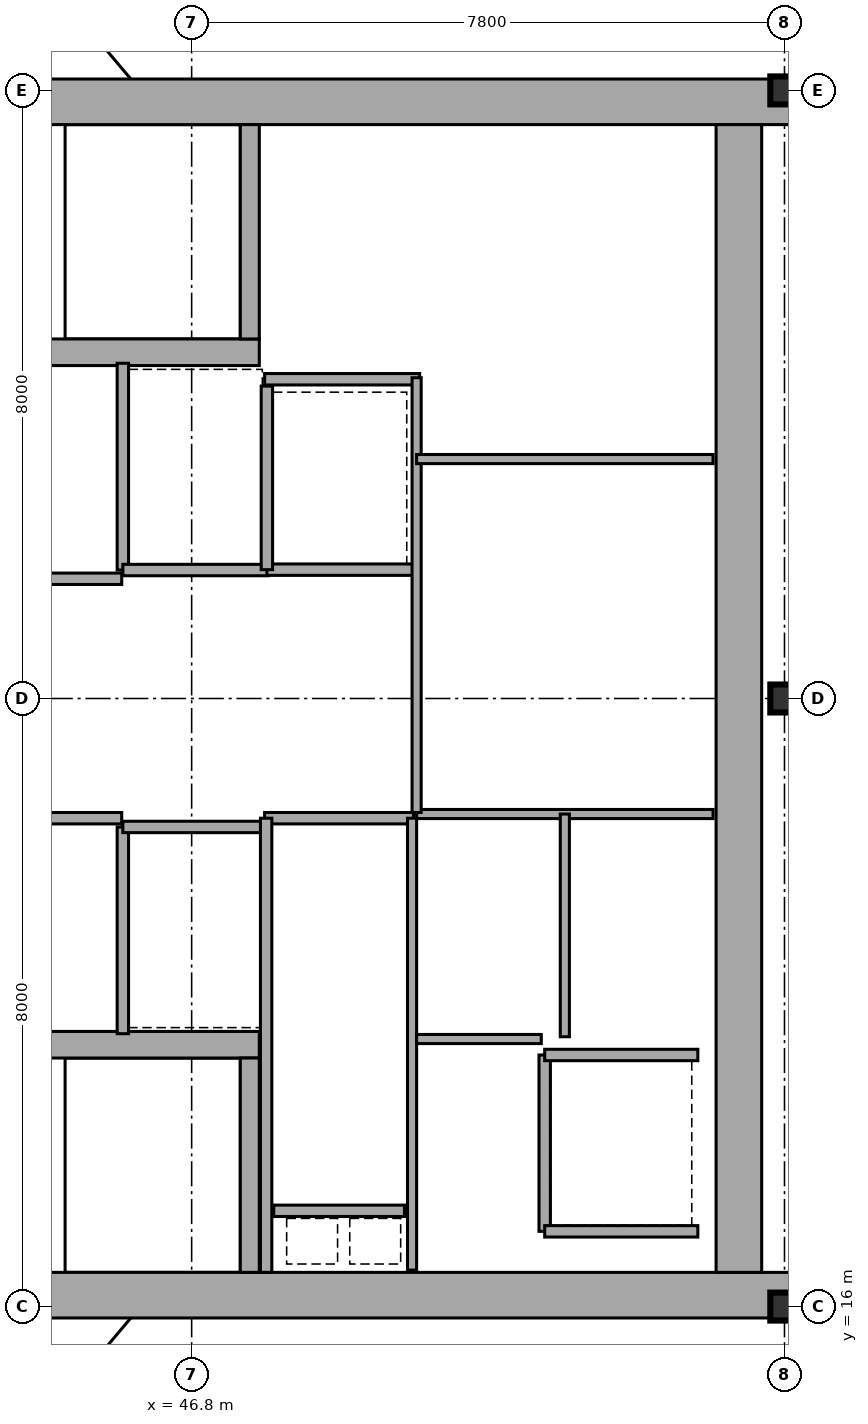
"""IFC4 building model, lengths in metres.
Left out: names, types, materials, properties, quantities, classifications, styles, units other than length and angle.
Written with IfcOpenShell. Run it as: python <this file> out.ifc"""

import sys

from ifc_helpers import new_model, si_unit, direction, frame, frame_2d, origin, origin_2d, place, context, subcontext, project, spatial, rectangle, i_section, extrude, element, fill, save


model = new_model("IFC4")
c1 = context("Model", 3, precision=1e-05, world=origin(), true_north=direction((0.0, 1.0)))
c2 = subcontext(c1, "Body", "Model", "MODEL_VIEW")
j1 = project(units=[si_unit("LENGTHUNIT", "METRE"), si_unit("PLANEANGLEUNIT", "RADIAN")], contexts=[c1])
p1 = place(None, origin())
s1 = spatial("IfcSite", under=j1, at=p1, CompositionType="ELEMENT")
p2 = place(p1, origin())
s2 = spatial("IfcBuilding", under=s1, at=p2, CompositionType="ELEMENT")
p3 = place(p2, frame((0.0, 0.0, 262.05)))
s3 = spatial("IfcBuildingStorey", under=s2, at=p3, CompositionType="ELEMENT", Elevation=262.05)
for number, where, z_axis, x_axis in (
    (1, (38.8, 31.85, 0.0), (0.0, 0.0, 1.0), (1.0, 0.0, 0.0)),
    (2, (38.8, 16.15, 0.0), (0.0, 0.0, 1.0), (1.0, 0.0, 0.0)),
):
    element("IfcWall", number, at=place(p3, frame(where, z_axis=z_axis, x_axis=x_axis)), inside=s3, PredefinedType="SHEAR", context=c2, shape_type="SweptSolid", body=[
        extrude(rectangle(XDim=16.0, YDim=0.6, at=frame_2d((8.0, 0.0))), origin(), (0.0, 0.0, 1.0), 4.56),
    ])
p4 = place(p3, frame((54.0, 16.45, 0.0), z_axis=(0.0, 0.0, 1.0), x_axis=(0.0, 1.0, 0.0)))
e3 = element("IfcWall", 3, at=p4, inside=s3, PredefinedType="SHEAR", context=c2, shape_type="SweptSolid", body=[
    extrude(rectangle(XDim=15.1, YDim=0.6, at=frame_2d((7.55, 0.0))), origin(), (0.0, 0.0, 1.0), 4.56),
])
p5 = place(p3, frame((39.98, 28.555, 0.0), z_axis=(0.0, 0.0, 1.0), x_axis=(1.0, 0.0, 0.0)))
e4 = element("IfcWall", 4, at=p5, inside=s3, PredefinedType="SHEAR", context=c2, shape_type="SweptSolid", body=[
    extrude(rectangle(XDim=7.71, YDim=0.35, at=frame_2d((3.855, 0.0))), origin(), (0.0, 0.0, 1.0), 4.56),
])
p6 = place(p5, frame((0.25, 0.0, 0.0)))
e5 = element("IfcOpeningElement", 5, at=p6, cuts=e4, PredefinedType="OPENING", context=c2, shape_type="SweptSolid", body=[
    extrude(rectangle(XDim=1.1, YDim=2.15, at=frame_2d((0.55, 1.075))), frame((0.0, 0.185, 0.0), z_axis=(0.0, -1.0, 0.0), x_axis=(1.0, 0.0, 0.0)), (0.0, 0.0, 1.0), 0.37),
])
p7 = place(p3, frame((39.98, 19.445, 0.0), z_axis=(0.0, 0.0, 1.0), x_axis=(1.0, 0.0, 0.0)))
e6 = element("IfcWall", 6, at=p7, inside=s3, PredefinedType="SHEAR", context=c2, shape_type="SweptSolid", body=[
    extrude(rectangle(XDim=7.71, YDim=0.35, at=frame_2d((3.855, 0.0))), origin(), (0.0, 0.0, 1.0), 4.56),
])
p8 = place(p7, frame((0.25, 0.0, 0.0)))
e7 = element("IfcOpeningElement", 7, at=p8, cuts=e6, PredefinedType="OPENING", context=c2, shape_type="SweptSolid", body=[
    extrude(rectangle(XDim=1.1, YDim=2.15, at=frame_2d((0.55, 1.075))), frame((0.0, 0.185, 0.0), z_axis=(0.0, -1.0, 0.0), x_axis=(1.0, 0.0, 0.0)), (0.0, 0.0, 1.0), 0.37),
])
for number, where, z_axis, x_axis in (
    (8, (47.565, 28.73, 0.0), (0.0, 0.0, 1.0), (0.0, 1.0, 0.0)),
    (9, (47.565, 16.45, 0.0), (0.0, 0.0, 1.0), (0.0, 1.0, 0.0)),
):
    element("IfcWall", number, at=place(p3, frame(where, z_axis=z_axis, x_axis=x_axis)), inside=s3, PredefinedType="SHEAR", context=c2, shape_type="SweptSolid", body=[
        extrude(rectangle(XDim=2.82, YDim=0.25, at=frame_2d((1.41, 0.0))), origin(), (0.0, 0.0, 1.0), 4.56),
    ])
for number, where, z_axis, x_axis in (
    (10, (54.6, 16.0, 0.0), (0.0, 0.0, 1.0), (1.0, 0.0, 0.0)),
    (11, (54.6, 24.0, 0.0), (0.0, 0.0, 1.0), (1.0, 0.0, 0.0)),
    (12, (54.6, 32.0, 0.0), (0.0, 0.0, 1.0), (1.0, 0.0, 0.0)),
):
    element("IfcColumn", number, at=place(p3, frame(where, z_axis=z_axis, x_axis=x_axis)), inside=s3, PredefinedType="COLUMN", context=c2, shape_type="SweptSolid", body=[
        extrude(i_section(OverallWidth=0.373, OverallDepth=0.368, WebThickness=0.015, FlangeThickness=0.024, at=origin_2d()), origin(), (0.0, 0.0, 1.0), 4.794),
    ])
p9 = place(p3, frame((39.98, 25.575, 0.0), z_axis=(0.0, 0.0, 1.0), x_axis=(1.0, 0.0, 0.0)))
e13 = element("IfcWall", 13, at=p9, inside=s3, PredefinedType="PARTITIONING", context=c2, shape_type="SweptSolid", body=[
    extrude(rectangle(XDim=5.9, YDim=0.15, at=frame_2d((2.95, 0.0))), origin(), (0.0, 0.0, 1.0), 4.56),
])
p10 = place(p9, frame((2.35, 0.0, 0.0)))
e14 = element("IfcOpeningElement", 14, at=p10, cuts=e13, PredefinedType="OPENING", context=c2, shape_type="SweptSolid", body=[
    extrude(rectangle(XDim=1.05, YDim=2.15, at=frame_2d((0.525, 1.075))), frame((0.0, 0.085, 0.0), z_axis=(0.0, -1.0, 0.0), x_axis=(1.0, 0.0, 0.0)), (0.0, 0.0, 1.0), 0.17),
])
p11 = place(p3, frame((39.98, 22.425, 0.0), z_axis=(0.0, 0.0, 1.0), x_axis=(1.0, 0.0, 0.0)))
e15 = element("IfcWall", 15, at=p11, inside=s3, PredefinedType="PARTITIONING", context=c2, shape_type="SweptSolid", body=[
    extrude(rectangle(XDim=5.9, YDim=0.15, at=frame_2d((2.95, 0.0))), origin(), (0.0, 0.0, 1.0), 4.56),
])
p12 = place(p11, frame((2.35, 0.0, 0.0)))
e16 = element("IfcOpeningElement", 16, at=p12, cuts=e15, PredefinedType="OPENING", context=c2, shape_type="SweptSolid", body=[
    extrude(rectangle(XDim=1.05, YDim=2.15, at=frame_2d((0.525, 1.075))), frame((0.0, 0.085, 0.0), z_axis=(0.0, -1.0, 0.0), x_axis=(1.0, 0.0, 0.0)), (0.0, 0.0, 1.0), 0.17),
])
p13 = place(p3, frame((45.895, 25.69, 0.0), z_axis=(0.0, 0.0, 1.0), x_axis=(0.0, 1.0, 0.0)))
e17 = element("IfcWall", 17, at=p13, inside=s3, PredefinedType="PARTITIONING", context=c2, shape_type="SweptSolid", body=[
    extrude(rectangle(XDim=2.72, YDim=0.15, at=frame_2d((1.36, 0.0))), origin(), (0.0, 0.0, 1.0), 4.56),
])
p14 = place(p13, frame((0.81, 0.0, 0.0)))
e18 = element("IfcOpeningElement", 18, at=p14, cuts=e17, PredefinedType="OPENING", context=c2, shape_type="SweptSolid", body=[
    extrude(rectangle(XDim=1.1, YDim=2.15, at=frame_2d((0.55, 1.075))), frame((0.0, 0.085, 0.0), z_axis=(0.0, -1.0, 0.0), x_axis=(1.0, 0.0, 0.0)), (0.0, 0.0, 1.0), 0.17),
])
p15 = place(p3, frame((45.895, 25.69, 0.0), z_axis=(0.0, 0.0, 1.0), x_axis=(1.0, 0.0, 0.0)))
e19 = element("IfcWall", 19, at=p15, inside=s3, PredefinedType="PARTITIONING", context=c2, shape_type="SweptSolid", body=[
    extrude(rectangle(XDim=1.915, YDim=0.15, at=frame_2d((0.958, 0.0))), origin(), (0.0, 0.0, 1.0), 4.56),
])
p16 = place(p3, frame((45.895, 19.59, 0.0), z_axis=(0.0, 0.0, 1.0), x_axis=(0.0, 1.0, 0.0)))
e20 = element("IfcWall", 20, at=p16, inside=s3, PredefinedType="PARTITIONING", context=c2, shape_type="SweptSolid", body=[
    extrude(rectangle(XDim=2.72, YDim=0.15, at=frame_2d((1.36, 0.0))), origin(), (0.0, 0.0, 1.0), 4.56),
])
p17 = place(p16, frame((0.81, 0.0, 0.0)))
e21 = element("IfcOpeningElement", 21, at=p17, cuts=e20, PredefinedType="OPENING", context=c2, shape_type="SweptSolid", body=[
    extrude(rectangle(XDim=1.1, YDim=2.15, at=frame_2d((0.55, 1.075))), frame((0.0, 0.085, 0.0), z_axis=(0.0, -1.0, 0.0), x_axis=(1.0, 0.0, 0.0)), (0.0, 0.0, 1.0), 0.17),
])
p18 = place(p3, frame((45.895, 22.31, 0.0), z_axis=(0.0, 0.0, 1.0), x_axis=(1.0, 0.0, 0.0)))
e22 = element("IfcWall", 22, at=p18, inside=s3, PredefinedType="PARTITIONING", context=c2, shape_type="SweptSolid", body=[
    extrude(rectangle(XDim=1.915, YDim=0.15, at=frame_2d((0.958, 0.0))), origin(), (0.0, 0.0, 1.0), 4.56),
])
p19 = place(p3, frame((47.79, 25.695, 0.0), z_axis=(0.0, 0.0, 1.0), x_axis=(1.0, 0.0, 0.0)))
e23 = element("IfcWall", 23, at=p19, inside=s3, PredefinedType="PARTITIONING", context=c2, shape_type="SweptSolid", body=[
    extrude(rectangle(XDim=1.92, YDim=0.15, at=frame_2d((0.96, 0.0))), origin(), (0.0, 0.0, 1.0), 4.56),
])
p20 = place(p19, frame((0.41, 0.0, 0.0)))
e24 = element("IfcOpeningElement", 24, at=p20, cuts=e23, PredefinedType="OPENING", context=c2, shape_type="SweptSolid", body=[
    extrude(rectangle(XDim=1.1, YDim=2.15, at=frame_2d((0.55, 1.075))), frame((0.0, 0.085, 0.0), z_axis=(0.0, -1.0, 0.0), x_axis=(1.0, 0.0, 0.0)), (0.0, 0.0, 1.0), 0.17),
])
p21 = place(p3, frame((47.79, 25.695, 0.0), z_axis=(0.0, 0.0, 1.0), x_axis=(0.0, 1.0, 0.0)))
e25 = element("IfcWall", 25, at=p21, inside=s3, PredefinedType="PARTITIONING", context=c2, shape_type="SweptSolid", body=[
    extrude(rectangle(XDim=2.415, YDim=0.15, at=frame_2d((1.208, 0.0))), origin(), (0.0, 0.0, 1.0), 4.56),
])
p22 = place(p3, frame((51.445, 16.99, 0.0), z_axis=(0.0, 0.0, 1.0), x_axis=(0.0, 1.0, 0.0)))
e26 = element("IfcWall", 26, at=p22, inside=s3, PredefinedType="PARTITIONING", context=c2, shape_type="SweptSolid", body=[
    extrude(rectangle(XDim=2.32, YDim=0.15, at=frame_2d((1.16, 0.0))), origin(), (0.0, 0.0, 1.0), 4.56),
])
p23 = place(p22, frame((0.61, 0.0, 0.0)))
e27 = element("IfcOpeningElement", 27, at=p23, cuts=e26, PredefinedType="OPENING", context=c2, shape_type="SweptSolid", body=[
    extrude(rectangle(XDim=1.1, YDim=2.15, at=frame_2d((0.55, 1.075))), frame((0.0, 0.085, 0.0), z_axis=(0.0, -1.0, 0.0), x_axis=(1.0, 0.0, 0.0)), (0.0, 0.0, 1.0), 0.17),
])
for number, where, z_axis, x_axis in (
    (28, (51.445, 16.99, 0.0), (0.0, 0.0, 1.0), (1.0, 0.0, 0.0)),
    (29, (51.445, 19.31, 0.0), (0.0, 0.0, 1.0), (1.0, 0.0, 0.0)),
):
    element("IfcWall", number, at=place(p3, frame(where, z_axis=z_axis, x_axis=x_axis)), inside=s3, PredefinedType="PARTITIONING", context=c2, shape_type="SweptSolid", body=[
        extrude(rectangle(XDim=2.015, YDim=0.15, at=frame_2d((1.007, 0.0))), origin(), (0.0, 0.0, 1.0), 4.56),
    ])
p24 = place(p3, frame((47.88, 17.26, 0.0), z_axis=(0.0, 0.0, 1.0), x_axis=(1.0, 0.0, 0.0)))
e30 = element("IfcWall", 30, at=p24, inside=s3, PredefinedType="PARTITIONING", context=c2, shape_type="SweptSolid", body=[
    extrude(rectangle(XDim=1.72, YDim=0.15, at=frame_2d((0.86, 0.0))), origin(), (0.0, 0.0, 1.0), 4.56),
])
p25 = place(p24, frame((0.42, 0.0, 0.0)))
e31 = element("IfcOpeningElement", 31, at=p25, cuts=e30, PredefinedType="OPENING", context=c2, shape_type="SweptSolid", body=[
    extrude(rectangle(XDim=0.85, YDim=2.15, at=frame_2d((0.425, 1.075))), frame((0.0, 0.085, 0.0), z_axis=(0.0, -1.0, 0.0), x_axis=(1.0, 0.0, 0.0)), (0.0, 0.0, 1.0), 0.17),
])
p26 = place(p3, frame((47.76, 22.425, 0.0), z_axis=(0.0, 0.0, 1.0), x_axis=(1.0, 0.0, 0.0)))
e32 = element("IfcWall", 32, at=p26, inside=s3, PredefinedType="PARTITIONING", context=c2, shape_type="SweptSolid", body=[
    extrude(rectangle(XDim=1.96, YDim=0.15, at=frame_2d((0.98, 0.0))), origin(), (0.0, 0.0, 1.0), 4.56),
])
p27 = place(p3, frame((47.78, 16.45, 0.0), z_axis=(0.0, 0.0, 1.0), x_axis=(0.0, 1.0, 0.0)))
e33 = element("IfcWall", 33, at=p27, inside=s3, PredefinedType="PARTITIONING", context=c2, shape_type="SweptSolid", body=[
    extrude(rectangle(XDim=5.975, YDim=0.15, at=frame_2d((2.988, 0.0))), origin(), (0.0, 0.0, 1.0), 4.56),
])
p28 = place(p3, frame((49.7, 16.48, 0.0), z_axis=(0.0, 0.0, 1.0), x_axis=(0.0, 1.0, 0.0)))
e34 = element("IfcWall", 34, at=p28, inside=s3, PredefinedType="PARTITIONING", context=c2, shape_type="SweptSolid", body=[
    extrude(rectangle(XDim=5.945, YDim=0.12, at=frame_2d((2.973, 0.0))), origin(), (0.0, 0.0, 1.0), 4.56),
])
p29 = place(p28, frame((3.35, 0.0, 0.0)))
e35 = element("IfcOpeningElement", 35, at=p29, cuts=e34, PredefinedType="OPENING", context=c2, shape_type="SweptSolid", body=[
    extrude(rectangle(XDim=0.95, YDim=2.15, at=frame_2d((0.475, 1.075))), frame((0.0, 0.07, 0.0), z_axis=(0.0, -1.0, 0.0), x_axis=(1.0, 0.0, 0.0)), (0.0, 0.0, 1.0), 0.14),
])
p30 = place(p3, frame((49.76, 22.48, 0.0), z_axis=(0.0, 0.0, 1.0), x_axis=(1.0, 0.0, 0.0)))
e36 = element("IfcWall", 36, at=p30, inside=s3, PredefinedType="PARTITIONING", context=c2, shape_type="SweptSolid", body=[
    extrude(rectangle(XDim=3.9, YDim=0.12, at=frame_2d((1.95, 0.0))), origin(), (0.0, 0.0, 1.0), 4.56),
])
p31 = place(p30, frame((0.42, 0.0, 0.0)))
e37 = element("IfcOpeningElement", 37, at=p31, cuts=e36, PredefinedType="OPENING", context=c2, shape_type="SweptSolid", body=[
    extrude(rectangle(XDim=0.85, YDim=2.15, at=frame_2d((0.425, 1.075))), frame((0.0, 0.07, 0.0), z_axis=(0.0, -1.0, 0.0), x_axis=(1.0, 0.0, 0.0)), (0.0, 0.0, 1.0), 0.14),
])
p32 = place(p3, frame((51.71, 19.55, 0.0), z_axis=(0.0, 0.0, 1.0), x_axis=(0.0, 1.0, 0.0)))
e38 = element("IfcWall", 38, at=p32, inside=s3, PredefinedType="PARTITIONING", context=c2, shape_type="SweptSolid", body=[
    extrude(rectangle(XDim=2.93, YDim=0.12, at=frame_2d((1.465, 0.0))), origin(), (0.0, 0.0, 1.0), 4.56),
])
p33 = place(p32, frame((0.95, 0.0, 0.0)))
e39 = element("IfcOpeningElement", 39, at=p33, cuts=e38, PredefinedType="OPENING", context=c2, shape_type="SweptSolid", body=[
    extrude(rectangle(XDim=0.85, YDim=2.15, at=frame_2d((0.425, 1.075))), frame((0.0, 0.07, 0.0), z_axis=(0.0, -1.0, 0.0), x_axis=(1.0, 0.0, 0.0)), (0.0, 0.0, 1.0), 0.14),
])
p34 = place(p3, frame((49.76, 19.52, 0.0), z_axis=(0.0, 0.0, 1.0), x_axis=(1.0, 0.0, 0.0)))
e40 = element("IfcWall", 40, at=p34, inside=s3, PredefinedType="PARTITIONING", context=c2, shape_type="SweptSolid", body=[
    extrude(rectangle(XDim=1.64, YDim=0.12, at=frame_2d((0.82, 0.0))), origin(), (0.0, 0.0, 1.0), 4.56),
])
p35 = place(p3, frame((47.76, 28.2, 0.0), z_axis=(0.0, 0.0, 1.0), x_axis=(1.0, 0.0, 0.0)))
e41 = element("IfcWall", 41, at=p35, inside=s3, PredefinedType="PARTITIONING", context=c2, shape_type="SweptSolid", body=[
    extrude(rectangle(XDim=2.04, YDim=0.15, at=frame_2d((1.02, 0.0))), origin(), (0.0, 0.0, 1.0), 4.56),
])
p36 = place(p3, frame((49.76, 22.5, 0.0), z_axis=(0.0, 0.0, 1.0), x_axis=(0.0, 1.0, 0.0)))
e42 = element("IfcWall", 42, at=p36, inside=s3, PredefinedType="PARTITIONING", context=c2, shape_type="SweptSolid", body=[
    extrude(rectangle(XDim=5.72, YDim=0.12, at=frame_2d((2.86, 0.0))), origin(), (0.0, 0.0, 1.0), 4.56),
])
p37 = place(p36, frame((0.95, 0.0, 0.0)))
e43 = element("IfcOpeningElement", 43, at=p37, cuts=e42, PredefinedType="OPENING", context=c2, shape_type="SweptSolid", body=[
    extrude(rectangle(XDim=0.95, YDim=2.15, at=frame_2d((0.475, 1.075))), frame((0.0, 0.07, 0.0), z_axis=(0.0, -1.0, 0.0), x_axis=(1.0, 0.0, 0.0)), (0.0, 0.0, 1.0), 0.14),
])
p38 = place(p3, frame((49.76, 27.15, 0.0), z_axis=(0.0, 0.0, 1.0), x_axis=(1.0, 0.0, 0.0)))
e44 = element("IfcWall", 44, at=p38, inside=s3, PredefinedType="PARTITIONING", context=c2, shape_type="SweptSolid", body=[
    extrude(rectangle(XDim=3.9, YDim=0.12, at=frame_2d((1.95, 0.0))), origin(), (0.0, 0.0, 1.0), 4.56),
])
p39 = place(p38, frame((1.6, 0.0, 0.0)))
e45 = element("IfcOpeningElement", 45, at=p39, cuts=e44, PredefinedType="OPENING", context=c2, shape_type="SweptSolid", body=[
    extrude(rectangle(XDim=0.85, YDim=2.15, at=frame_2d((0.425, 1.075))), frame((0.0, 0.07, 0.0), z_axis=(0.0, -1.0, 0.0), x_axis=(1.0, 0.0, 0.0)), (0.0, 0.0, 1.0), 0.14),
])
p40 = place(p14, frame((1.1, 0.0, 0.0), z_axis=(0.0, 0.0, 1.0), x_axis=(-1.0, 0.0, 0.0)))
e46 = element("IfcDoor", 46, at=p40, inside=s3, OperationType="DOUBLE_DOOR_SLIDING", PredefinedType="DOOR", context=c2, shape_type="SweptSolid", body=[
    extrude(rectangle(XDim=1.1, YDim=2.15, at=frame_2d((0.55, 1.075))), frame((0.0, 0.025, 0.0), z_axis=(0.0, -1.0, 0.0), x_axis=(1.0, 0.0, 0.0)), (0.0, 0.0, 1.0), 0.05),
])
fill(e18, e46)
p41 = place(p17, frame((1.1, 0.0, 0.0), z_axis=(0.0, 0.0, 1.0), x_axis=(-1.0, 0.0, 0.0)))
e47 = element("IfcDoor", 47, at=p41, inside=s3, OperationType="DOUBLE_DOOR_SLIDING", PredefinedType="DOOR", context=c2, shape_type="SweptSolid", body=[
    extrude(rectangle(XDim=1.1, YDim=2.15, at=frame_2d((0.55, 1.075))), frame((0.0, 0.025, 0.0), z_axis=(0.0, -1.0, 0.0), x_axis=(1.0, 0.0, 0.0)), (0.0, 0.0, 1.0), 0.05),
])
fill(e21, e47)
p42 = place(p20, frame((1.1, 0.0, 0.0), z_axis=(0.0, 0.0, 1.0), x_axis=(-1.0, 0.0, 0.0)))
e48 = element("IfcDoor", 48, at=p42, inside=s3, OperationType="DOUBLE_DOOR_SLIDING", PredefinedType="DOOR", context=c2, shape_type="SweptSolid", body=[
    extrude(rectangle(XDim=1.1, YDim=2.15, at=frame_2d((0.55, 1.075))), frame((0.0, 0.025, 0.0), z_axis=(0.0, -1.0, 0.0), x_axis=(1.0, 0.0, 0.0)), (0.0, 0.0, 1.0), 0.05),
])
fill(e24, e48)
p43 = place(p23, frame((1.1, 0.0, 0.0), z_axis=(0.0, 0.0, 1.0), x_axis=(-1.0, 0.0, 0.0)))
e49 = element("IfcDoor", 49, at=p43, inside=s3, OperationType="DOUBLE_DOOR_SLIDING", PredefinedType="DOOR", context=c2, shape_type="SweptSolid", body=[
    extrude(rectangle(XDim=1.1, YDim=2.15, at=frame_2d((0.55, 1.075))), frame((0.0, 0.025, 0.0), z_axis=(0.0, -1.0, 0.0), x_axis=(1.0, 0.0, 0.0)), (0.0, 0.0, 1.0), 0.05),
])
fill(e27, e49)
p44 = place(p25, origin())
e50 = element("IfcDoor", 50, at=p44, inside=s3, OperationType="SINGLE_SWING_LEFT", PredefinedType="TRAPDOOR", context=c2, shape_type="SweptSolid", body=[
    extrude(rectangle(XDim=0.85, YDim=2.15, at=frame_2d((0.425, 1.075))), frame((0.0, 0.025, 0.0), z_axis=(0.0, -1.0, 0.0), x_axis=(1.0, 0.0, 0.0)), (0.0, 0.0, 1.0), 0.05),
])
fill(e31, e50)
p45 = place(p29, frame((0.95, 0.0, 0.0), z_axis=(0.0, 0.0, 1.0), x_axis=(-1.0, 0.0, 0.0)))
e51 = element("IfcDoor", 51, at=p45, inside=s3, OperationType="SINGLE_SWING_LEFT", PredefinedType="DOOR", context=c2, shape_type="SweptSolid", body=[
    extrude(rectangle(XDim=0.95, YDim=2.15, at=frame_2d((0.475, 1.075))), frame((0.0, 0.025, 0.0), z_axis=(0.0, -1.0, 0.0), x_axis=(1.0, 0.0, 0.0)), (0.0, 0.0, 1.0), 0.05),
])
fill(e35, e51)
p46 = place(p31, frame((0.85, 0.0, 0.0), z_axis=(0.0, 0.0, 1.0), x_axis=(-1.0, 0.0, 0.0)))
e52 = element("IfcDoor", 52, at=p46, inside=s3, OperationType="SINGLE_SWING_LEFT", PredefinedType="DOOR", context=c2, shape_type="SweptSolid", body=[
    extrude(rectangle(XDim=0.85, YDim=2.15, at=frame_2d((0.425, 1.075))), frame((0.0, 0.025, 0.0), z_axis=(0.0, -1.0, 0.0), x_axis=(1.0, 0.0, 0.0)), (0.0, 0.0, 1.0), 0.05),
])
fill(e37, e52)
p47 = place(p33, origin())
e53 = element("IfcDoor", 53, at=p47, inside=s3, OperationType="SINGLE_SWING_RIGHT", PredefinedType="DOOR", context=c2, shape_type="SweptSolid", body=[
    extrude(rectangle(XDim=0.85, YDim=2.15, at=frame_2d((0.425, 1.075))), frame((0.0, 0.025, 0.0), z_axis=(0.0, -1.0, 0.0), x_axis=(1.0, 0.0, 0.0)), (0.0, 0.0, 1.0), 0.05),
])
fill(e39, e53)
p48 = place(p37, origin())
e54 = element("IfcDoor", 54, at=p48, inside=s3, OperationType="SINGLE_SWING_LEFT", PredefinedType="DOOR", context=c2, shape_type="SweptSolid", body=[
    extrude(rectangle(XDim=0.95, YDim=2.15, at=frame_2d((0.475, 1.075))), frame((0.0, 0.025, 0.0), z_axis=(0.0, -1.0, 0.0), x_axis=(1.0, 0.0, 0.0)), (0.0, 0.0, 1.0), 0.05),
])
fill(e43, e54)
p49 = place(p39, origin())
e55 = element("IfcDoor", 55, at=p49, inside=s3, OperationType="SINGLE_SWING_LEFT", PredefinedType="DOOR", context=c2, shape_type="SweptSolid", body=[
    extrude(rectangle(XDim=0.85, YDim=2.15, at=frame_2d((0.425, 1.075))), frame((0.0, 0.025, 0.0), z_axis=(0.0, -1.0, 0.0), x_axis=(1.0, 0.0, 0.0)), (0.0, 0.0, 1.0), 0.05),
])
fill(e45, e55)
save(model, sys.argv[1])
